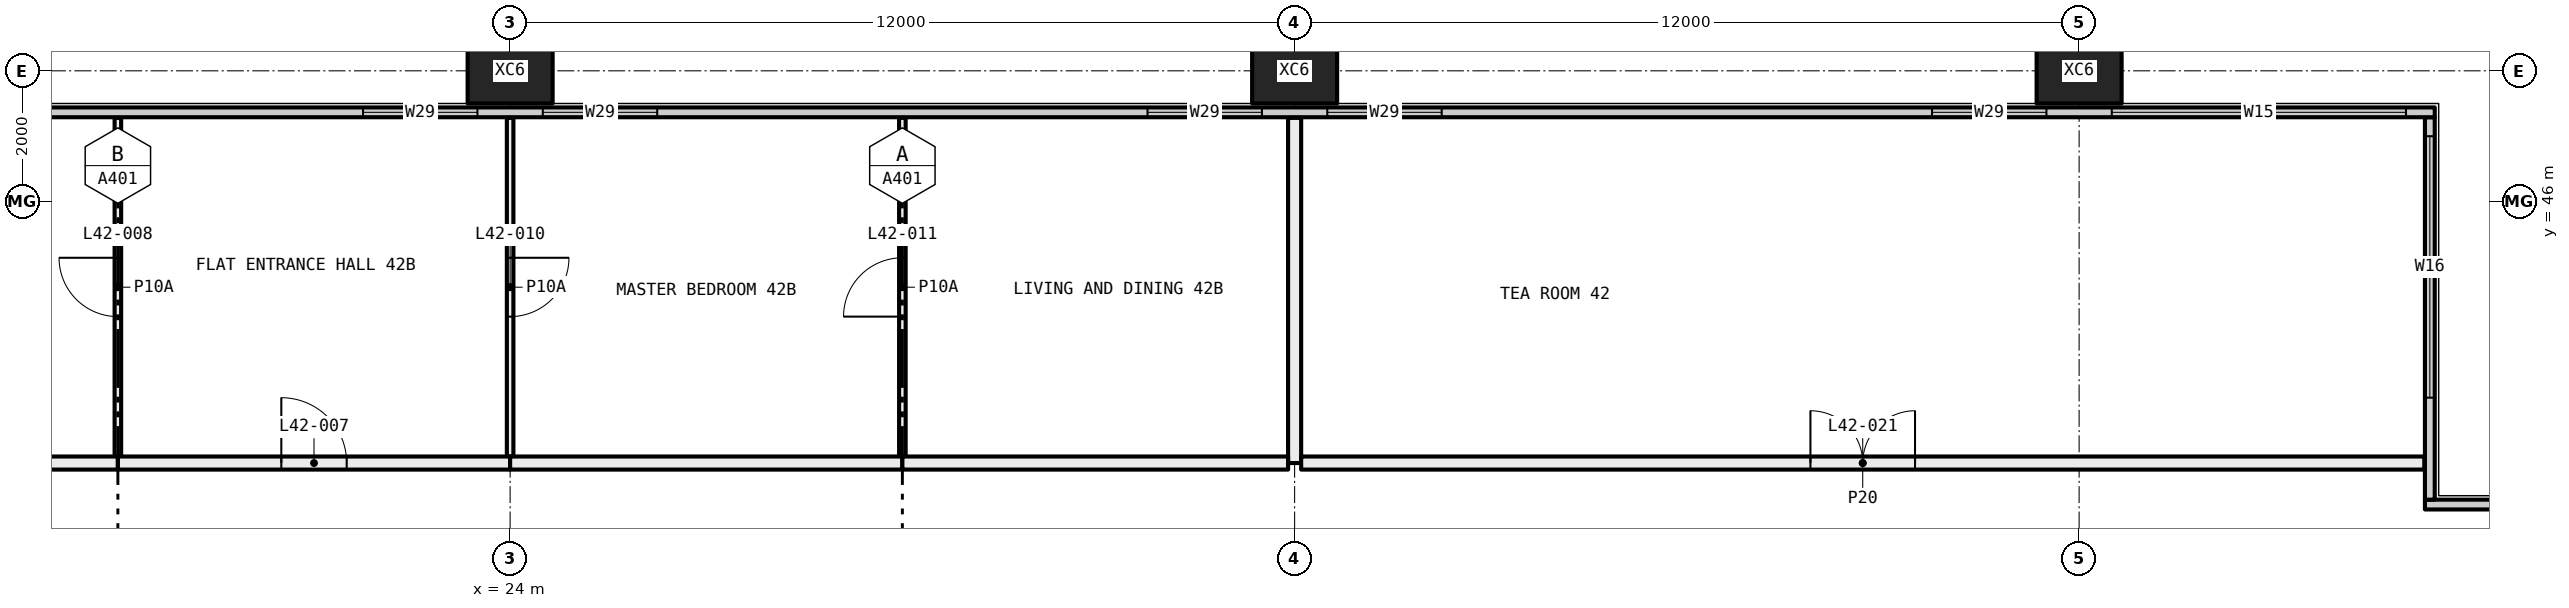
"""IFC4 building model, lengths in metres.
Left out: names, types, materials, properties, quantities, classifications, styles, units other than length and angle.
Written with IfcOpenShell. Run it as: python <this file> out.ifc"""

import sys

from ifc_helpers import new_model, si_unit, direction, frame, frame_2d, origin, origin_2d, place, context, subcontext, project, spatial, rectangle, hollow_rectangle, extrude, element, fill, save


model = new_model("IFC4")
c1 = context("Model", 3, precision=1e-05, world=origin(), true_north=direction((0.0, 1.0)))
c2 = subcontext(c1, "Body", "Model", "MODEL_VIEW")
j1 = project(units=[si_unit("LENGTHUNIT", "METRE"), si_unit("PLANEANGLEUNIT", "RADIAN")], contexts=[c1])
p1 = place(None, origin())
s1 = spatial("IfcSite", under=j1, at=p1, CompositionType="ELEMENT")
p2 = place(p1, origin())
s2 = spatial("IfcBuilding", under=s1, at=p2, CompositionType="ELEMENT")
p3 = place(p2, frame((0.0, 0.0, 161.7)))
s3 = spatial("IfcBuildingStorey", under=s2, at=p3, CompositionType="ELEMENT", Elevation=161.7)
for number, where, z_axis, x_axis in (
    (1, (24.0, 48.0, -0.4), (0.0, 0.0, 1.0), (1.0, 0.0, 0.0)),
    (2, (36.0, 48.0, -0.4), (0.0, 0.0, 1.0), (1.0, 0.0, 0.0)),
    (3, (48.0, 48.0, -0.4), (0.0, 0.0, 1.0), (1.0, 0.0, 0.0)),
):
    element("IfcColumn", number, at=place(p3, frame(where, z_axis=z_axis, x_axis=x_axis)), inside=s3, PredefinedType="COLUMN", context=c2, shape_type="SweptSolid", body=[
        extrude(hollow_rectangle(XDim=1.3, YDim=1.0, WallThickness=0.05, at=origin_2d()), origin(), (0.0, 0.0, 1.0), 3.45),
    ])
p4 = place(p3, frame((53.29, 41.365, 0.0), z_axis=(0.0, 0.0, 1.0), x_axis=(1.0, 0.0, 0.0)))
e4 = element("IfcWall", 4, at=p4, inside=s3, PredefinedType="ELEMENTEDWALL", context=c2, shape_type="SweptSolid", body=[
    extrude(rectangle(XDim=6.15, YDim=0.15, at=frame_2d((3.075, 0.0))), origin(), (0.0, 0.0, 1.0), 3.05),
])
p5 = place(p4, frame((1.71, 0.0, 0.45)))
e5 = element("IfcOpeningElement", 5, at=p5, cuts=e4, PredefinedType="OPENING", context=c2, shape_type="SweptSolid", body=[
    extrude(rectangle(XDim=4.0, YDim=2.55, at=frame_2d((2.0, 1.275))), frame((0.0, 0.085, 0.0), z_axis=(0.0, -1.0, 0.0), x_axis=(1.0, 0.0, 0.0)), (0.0, 0.0, 1.0), 0.17),
])
p6 = place(p3, frame((53.365, 41.44, 0.0), z_axis=(0.0, 0.0, 1.0), x_axis=(0.0, 1.0, 0.0)))
e6 = element("IfcWall", 6, at=p6, inside=s3, PredefinedType="ELEMENTEDWALL", context=c2, shape_type="SweptSolid", body=[
    extrude(rectangle(XDim=5.85, YDim=0.15, at=frame_2d((2.925, 0.0))), origin(), (0.0, 0.0, 1.0), 3.05),
])
p7 = place(p6, frame((1.56, 0.0, 0.45)))
e7 = element("IfcOpeningElement", 7, at=p7, cuts=e6, PredefinedType="OPENING", context=c2, shape_type="SweptSolid", body=[
    extrude(rectangle(XDim=4.0, YDim=2.55, at=frame_2d((2.0, 1.275))), frame((0.0, 0.085, 0.0), z_axis=(0.0, -1.0, 0.0), x_axis=(1.0, 0.0, 0.0)), (0.0, 0.0, 1.0), 0.17),
])
p8 = place(p3, frame((6.56, 47.365, 0.0), z_axis=(0.0, 0.0, 1.0), x_axis=(1.0, 0.0, 0.0)))
e8 = element("IfcWall", 8, at=p8, inside=s3, PredefinedType="ELEMENTEDWALL", context=c2, shape_type="SweptSolid", body=[
    extrude(rectangle(XDim=46.88, YDim=0.15, at=frame_2d((23.44, 0.0))), origin(), (0.0, 0.0, 1.0), 3.05),
])
p9 = place(p8, frame((0.44, 0.0, 0.45)))
e9 = element("IfcOpeningElement", 9, at=p9, cuts=e8, PredefinedType="OPENING", context=c2, shape_type="SweptSolid", body=[
    extrude(rectangle(XDim=4.5, YDim=2.55, at=frame_2d((2.25, 1.275))), frame((0.0, 0.085, 0.0), z_axis=(0.0, -1.0, 0.0), x_axis=(1.0, 0.0, 0.0)), (0.0, 0.0, 1.0), 0.17),
])
p10 = place(p8, frame((5.94, 0.0, 0.45)))
e10 = element("IfcOpeningElement", 10, at=p10, cuts=e8, PredefinedType="OPENING", context=c2, shape_type="SweptSolid", body=[
    extrude(rectangle(XDim=1.75, YDim=2.55, at=frame_2d((0.875, 1.275))), frame((0.0, 0.085, 0.0), z_axis=(0.0, -1.0, 0.0), x_axis=(1.0, 0.0, 0.0)), (0.0, 0.0, 1.0), 0.17),
])
p11 = place(p8, frame((15.19, 0.0, 0.45)))
e11 = element("IfcOpeningElement", 11, at=p11, cuts=e8, PredefinedType="OPENING", context=c2, shape_type="SweptSolid", body=[
    extrude(rectangle(XDim=1.75, YDim=2.55, at=frame_2d((0.875, 1.275))), frame((0.0, 0.085, 0.0), z_axis=(0.0, -1.0, 0.0), x_axis=(1.0, 0.0, 0.0)), (0.0, 0.0, 1.0), 0.17),
])
p12 = place(p8, frame((17.94, 0.0, 0.45)))
e12 = element("IfcOpeningElement", 12, at=p12, cuts=e8, PredefinedType="OPENING", context=c2, shape_type="SweptSolid", body=[
    extrude(rectangle(XDim=1.75, YDim=2.55, at=frame_2d((0.875, 1.275))), frame((0.0, 0.085, 0.0), z_axis=(0.0, -1.0, 0.0), x_axis=(1.0, 0.0, 0.0)), (0.0, 0.0, 1.0), 0.17),
])
p13 = place(p8, frame((27.19, 0.0, 0.45)))
e13 = element("IfcOpeningElement", 13, at=p13, cuts=e8, PredefinedType="OPENING", context=c2, shape_type="SweptSolid", body=[
    extrude(rectangle(XDim=1.75, YDim=2.55, at=frame_2d((0.875, 1.275))), frame((0.0, 0.085, 0.0), z_axis=(0.0, -1.0, 0.0), x_axis=(1.0, 0.0, 0.0)), (0.0, 0.0, 1.0), 0.17),
])
p14 = place(p8, frame((29.94, 0.0, 0.45)))
e14 = element("IfcOpeningElement", 14, at=p14, cuts=e8, PredefinedType="OPENING", context=c2, shape_type="SweptSolid", body=[
    extrude(rectangle(XDim=1.75, YDim=2.55, at=frame_2d((0.875, 1.275))), frame((0.0, 0.085, 0.0), z_axis=(0.0, -1.0, 0.0), x_axis=(1.0, 0.0, 0.0)), (0.0, 0.0, 1.0), 0.17),
])
p15 = place(p8, frame((39.19, 0.0, 0.45)))
e15 = element("IfcOpeningElement", 15, at=p15, cuts=e8, PredefinedType="OPENING", context=c2, shape_type="SweptSolid", body=[
    extrude(rectangle(XDim=1.75, YDim=2.55, at=frame_2d((0.875, 1.275))), frame((0.0, 0.085, 0.0), z_axis=(0.0, -1.0, 0.0), x_axis=(1.0, 0.0, 0.0)), (0.0, 0.0, 1.0), 0.17),
])
p16 = place(p8, frame((41.94, 0.0, 0.45)))
e16 = element("IfcOpeningElement", 16, at=p16, cuts=e8, PredefinedType="OPENING", context=c2, shape_type="SweptSolid", body=[
    extrude(rectangle(XDim=4.5, YDim=2.55, at=frame_2d((2.25, 1.275))), frame((0.0, 0.085, 0.0), z_axis=(0.0, -1.0, 0.0), x_axis=(1.0, 0.0, 0.0)), (0.0, 0.0, 1.0), 0.17),
])
p17 = place(p3, frame((18.0, 42.1, 0.0), z_axis=(0.0, 0.0, 1.0), x_axis=(0.0, 1.0, 0.0)))
e17 = element("IfcWall", 17, at=p17, inside=s3, PredefinedType="PARTITIONING", context=c2, shape_type="SweptSolid", body=[
    extrude(rectangle(XDim=5.18, YDim=0.1, at=frame_2d((2.59, 0.0))), origin(), (0.0, 0.0, 1.0), 3.05),
])
p18 = place(p17, frame((2.14, 0.0, 0.0)))
e18 = element("IfcOpeningElement", 18, at=p18, cuts=e17, PredefinedType="OPENING", context=c2, shape_type="SweptSolid", body=[
    extrude(rectangle(XDim=0.9, YDim=2.1, at=frame_2d((0.45, 1.05))), frame((0.0, 0.06, 0.0), z_axis=(0.0, -1.0, 0.0), x_axis=(1.0, 0.0, 0.0)), (0.0, 0.0, 1.0), 0.12),
])
p19 = place(p3, frame((12.0, 42.0, 0.0), z_axis=(0.0, 0.0, 1.0), x_axis=(1.0, 0.0, 0.0)))
e19 = element("IfcWall", 19, at=p19, inside=s3, PredefinedType="PARTITIONING", context=c2, shape_type="SweptSolid", body=[
    extrude(rectangle(XDim=6.0, YDim=0.2, at=frame_2d((3.0, 0.0))), origin(), (0.0, 0.0, 1.0), 3.05),
])
p20 = place(p3, frame((24.0, 42.1, 0.0), z_axis=(0.0, 0.0, 1.0), x_axis=(0.0, 1.0, 0.0)))
e20 = element("IfcWall", 20, at=p20, inside=s3, PredefinedType="PARTITIONING", context=c2, shape_type="SweptSolid", body=[
    extrude(rectangle(XDim=5.18, YDim=0.1, at=frame_2d((2.59, 0.0))), origin(), (0.0, 0.0, 1.0), 3.05),
])
p21 = place(p20, frame((2.14, 0.0, 0.0)))
e21 = element("IfcOpeningElement", 21, at=p21, cuts=e20, PredefinedType="OPENING", context=c2, shape_type="SweptSolid", body=[
    extrude(rectangle(XDim=0.9, YDim=2.1, at=frame_2d((0.45, 1.05))), frame((0.0, 0.06, 0.0), z_axis=(0.0, -1.0, 0.0), x_axis=(1.0, 0.0, 0.0)), (0.0, 0.0, 1.0), 0.12),
])
p22 = place(p3, frame((18.0, 42.0, 0.0), z_axis=(0.0, 0.0, 1.0), x_axis=(1.0, 0.0, 0.0)))
e22 = element("IfcWall", 22, at=p22, inside=s3, PredefinedType="PARTITIONING", context=c2, shape_type="SweptSolid", body=[
    extrude(rectangle(XDim=6.0, YDim=0.2, at=frame_2d((3.0, 0.0))), origin(), (0.0, 0.0, 1.0), 3.05),
])
p23 = place(p22, frame((2.5, 0.0, 0.0)))
e23 = element("IfcOpeningElement", 23, at=p23, cuts=e22, PredefinedType="OPENING", context=c2, shape_type="SweptSolid", body=[
    extrude(rectangle(XDim=1.0, YDim=2.1, at=frame_2d((0.5, 1.05))), frame((0.0, 0.11, 0.0), z_axis=(0.0, -1.0, 0.0), x_axis=(1.0, 0.0, 0.0)), (0.0, 0.0, 1.0), 0.22),
])
p24 = place(p3, frame((30.0, 42.1, 0.0), z_axis=(0.0, 0.0, 1.0), x_axis=(0.0, 1.0, 0.0)))
e24 = element("IfcWall", 24, at=p24, inside=s3, PredefinedType="PARTITIONING", context=c2, shape_type="SweptSolid", body=[
    extrude(rectangle(XDim=5.18, YDim=0.1, at=frame_2d((2.59, 0.0))), origin(), (0.0, 0.0, 1.0), 3.05),
])
p25 = place(p24, frame((2.14, 0.0, 0.0)))
e25 = element("IfcOpeningElement", 25, at=p25, cuts=e24, PredefinedType="OPENING", context=c2, shape_type="SweptSolid", body=[
    extrude(rectangle(XDim=0.9, YDim=2.1, at=frame_2d((0.45, 1.05))), frame((0.0, 0.06, 0.0), z_axis=(0.0, -1.0, 0.0), x_axis=(1.0, 0.0, 0.0)), (0.0, 0.0, 1.0), 0.12),
])
p26 = place(p3, frame((24.0, 42.0, 0.0), z_axis=(0.0, 0.0, 1.0), x_axis=(1.0, 0.0, 0.0)))
e26 = element("IfcWall", 26, at=p26, inside=s3, PredefinedType="PARTITIONING", context=c2, shape_type="SweptSolid", body=[
    extrude(rectangle(XDim=6.0, YDim=0.2, at=frame_2d((3.0, 0.0))), origin(), (0.0, 0.0, 1.0), 3.05),
])
p27 = place(p3, frame((36.0, 42.0, 0.0), z_axis=(0.0, 0.0, 1.0), x_axis=(0.0, 1.0, 0.0)))
e27 = element("IfcWall", 27, at=p27, inside=s3, PredefinedType="PARTITIONING", context=c2, shape_type="SweptSolid", body=[
    extrude(rectangle(XDim=5.28, YDim=0.2, at=frame_2d((2.64, 0.0))), origin(), (0.0, 0.0, 1.0), 2.45),
])
p28 = place(p3, frame((30.0, 42.0, 0.0), z_axis=(0.0, 0.0, 1.0), x_axis=(1.0, 0.0, 0.0)))
e28 = element("IfcWall", 28, at=p28, inside=s3, PredefinedType="PARTITIONING", context=c2, shape_type="SweptSolid", body=[
    extrude(rectangle(XDim=5.9, YDim=0.2, at=frame_2d((2.95, 0.0))), origin(), (0.0, 0.0, 1.0), 3.05),
])
p29 = place(p3, frame((36.1, 42.0, 0.0), z_axis=(0.0, 0.0, 1.0), x_axis=(1.0, 0.0, 0.0)))
e29 = element("IfcWall", 29, at=p29, inside=s3, PredefinedType="PARTITIONING", context=c2, shape_type="SweptSolid", body=[
    extrude(rectangle(XDim=17.18, YDim=0.2, at=frame_2d((8.59, 0.0))), origin(), (0.0, 0.0, 1.0), 3.05),
])
p30 = place(p29, frame((7.79, 0.0, 0.0)))
e30 = element("IfcOpeningElement", 30, at=p30, cuts=e29, PredefinedType="OPENING", context=c2, shape_type="SweptSolid", body=[
    extrude(rectangle(XDim=1.6, YDim=2.1, at=frame_2d((0.8, 1.05))), frame((0.0, 0.11, 0.0), z_axis=(0.0, -1.0, 0.0), x_axis=(1.0, 0.0, 0.0)), (0.0, 0.0, 1.0), 0.22),
])
p31 = place(p7, origin())
e31 = element("IfcWindow", 31, at=p31, inside=s3, PartitioningType="SINGLE_PANEL", PredefinedType="WINDOW", context=c2, shape_type="SweptSolid", body=[
    extrude(rectangle(XDim=4.0, YDim=2.55, at=frame_2d((2.0, 1.275))), frame((0.0, 0.03, 0.0), z_axis=(0.0, -1.0, 0.0), x_axis=(1.0, 0.0, 0.0)), (0.0, 0.0, 1.0), 0.06),
])
fill(e7, e31)
p32 = place(p11, origin())
e32 = element("IfcWindow", 32, at=p32, inside=s3, PartitioningType="SINGLE_PANEL", PredefinedType="WINDOW", context=c2, shape_type="SweptSolid", body=[
    extrude(rectangle(XDim=1.75, YDim=2.55, at=frame_2d((0.875, 1.275))), frame((0.0, 0.03, 0.0), z_axis=(0.0, -1.0, 0.0), x_axis=(1.0, 0.0, 0.0)), (0.0, 0.0, 1.0), 0.06),
])
fill(e11, e32)
p33 = place(p12, origin())
e33 = element("IfcWindow", 33, at=p33, inside=s3, PartitioningType="SINGLE_PANEL", PredefinedType="WINDOW", context=c2, shape_type="SweptSolid", body=[
    extrude(rectangle(XDim=1.75, YDim=2.55, at=frame_2d((0.875, 1.275))), frame((0.0, 0.03, 0.0), z_axis=(0.0, -1.0, 0.0), x_axis=(1.0, 0.0, 0.0)), (0.0, 0.0, 1.0), 0.06),
])
fill(e12, e33)
p34 = place(p13, origin())
e34 = element("IfcWindow", 34, at=p34, inside=s3, PartitioningType="SINGLE_PANEL", PredefinedType="WINDOW", context=c2, shape_type="SweptSolid", body=[
    extrude(rectangle(XDim=1.75, YDim=2.55, at=frame_2d((0.875, 1.275))), frame((0.0, 0.03, 0.0), z_axis=(0.0, -1.0, 0.0), x_axis=(1.0, 0.0, 0.0)), (0.0, 0.0, 1.0), 0.06),
])
fill(e13, e34)
p35 = place(p14, origin())
e35 = element("IfcWindow", 35, at=p35, inside=s3, PartitioningType="SINGLE_PANEL", PredefinedType="WINDOW", context=c2, shape_type="SweptSolid", body=[
    extrude(rectangle(XDim=1.75, YDim=2.55, at=frame_2d((0.875, 1.275))), frame((0.0, 0.03, 0.0), z_axis=(0.0, -1.0, 0.0), x_axis=(1.0, 0.0, 0.0)), (0.0, 0.0, 1.0), 0.06),
])
fill(e14, e35)
p36 = place(p15, origin())
e36 = element("IfcWindow", 36, at=p36, inside=s3, PartitioningType="SINGLE_PANEL", PredefinedType="WINDOW", context=c2, shape_type="SweptSolid", body=[
    extrude(rectangle(XDim=1.75, YDim=2.55, at=frame_2d((0.875, 1.275))), frame((0.0, 0.03, 0.0), z_axis=(0.0, -1.0, 0.0), x_axis=(1.0, 0.0, 0.0)), (0.0, 0.0, 1.0), 0.06),
])
fill(e15, e36)
p37 = place(p16, origin())
e37 = element("IfcWindow", 37, at=p37, inside=s3, PartitioningType="SINGLE_PANEL", PredefinedType="WINDOW", context=c2, shape_type="SweptSolid", body=[
    extrude(rectangle(XDim=4.5, YDim=2.55, at=frame_2d((2.25, 1.275))), frame((0.0, 0.03, 0.0), z_axis=(0.0, -1.0, 0.0), x_axis=(1.0, 0.0, 0.0)), (0.0, 0.0, 1.0), 0.06),
])
fill(e16, e37)
p38 = place(p23, origin())
e38 = element("IfcDoor", 38, at=p38, inside=s3, OperationType="SINGLE_SWING_RIGHT", PredefinedType="DOOR", context=c2, shape_type="SweptSolid", body=[
    extrude(rectangle(XDim=1.0, YDim=2.1, at=frame_2d((0.5, 1.05))), frame((0.0, 0.025, 0.0), z_axis=(0.0, -1.0, 0.0), x_axis=(1.0, 0.0, 0.0)), (0.0, 0.0, 1.0), 0.05),
])
fill(e23, e38)
p39 = place(p18, origin())
e39 = element("IfcDoor", 39, at=p39, inside=s3, OperationType="SINGLE_SWING_LEFT", PredefinedType="DOOR", context=c2, shape_type="SweptSolid", body=[
    extrude(rectangle(XDim=0.9, YDim=2.1, at=frame_2d((0.45, 1.05))), frame((0.0, 0.025, 0.0), z_axis=(0.0, -1.0, 0.0), x_axis=(1.0, 0.0, 0.0)), (0.0, 0.0, 1.0), 0.05),
])
fill(e18, e39)
p40 = place(p21, frame((0.9, 0.0, 0.0), x_axis=(-1.0, 0.0, 0.0)))
e40 = element("IfcDoor", 40, at=p40, inside=s3, OperationType="SINGLE_SWING_RIGHT", PredefinedType="DOOR", context=c2, shape_type="SweptSolid", body=[
    extrude(rectangle(XDim=0.9, YDim=2.1, at=frame_2d((0.45, 1.05))), frame((0.0, 0.025, 0.0), z_axis=(0.0, -1.0, 0.0), x_axis=(1.0, 0.0, 0.0)), (0.0, 0.0, 1.0), 0.05),
])
fill(e21, e40)
p41 = place(p25, origin())
e41 = element("IfcDoor", 41, at=p41, inside=s3, OperationType="SINGLE_SWING_RIGHT", PredefinedType="DOOR", context=c2, shape_type="SweptSolid", body=[
    extrude(rectangle(XDim=0.9, YDim=2.1, at=frame_2d((0.45, 1.05))), frame((0.0, 0.025, 0.0), z_axis=(0.0, -1.0, 0.0), x_axis=(1.0, 0.0, 0.0)), (0.0, 0.0, 1.0), 0.05),
])
fill(e25, e41)
p42 = place(p30, origin())
e42 = element("IfcDoor", 42, at=p42, inside=s3, OperationType="DOUBLE_DOOR_SINGLE_SWING", PredefinedType="DOOR", context=c2, shape_type="SweptSolid", body=[
    extrude(rectangle(XDim=1.6, YDim=2.1, at=frame_2d((0.8, 1.05))), frame((0.0, 0.025, 0.0), z_axis=(0.0, -1.0, 0.0), x_axis=(1.0, 0.0, 0.0)), (0.0, 0.0, 1.0), 0.05),
])
fill(e30, e42)
save(model, sys.argv[1])
